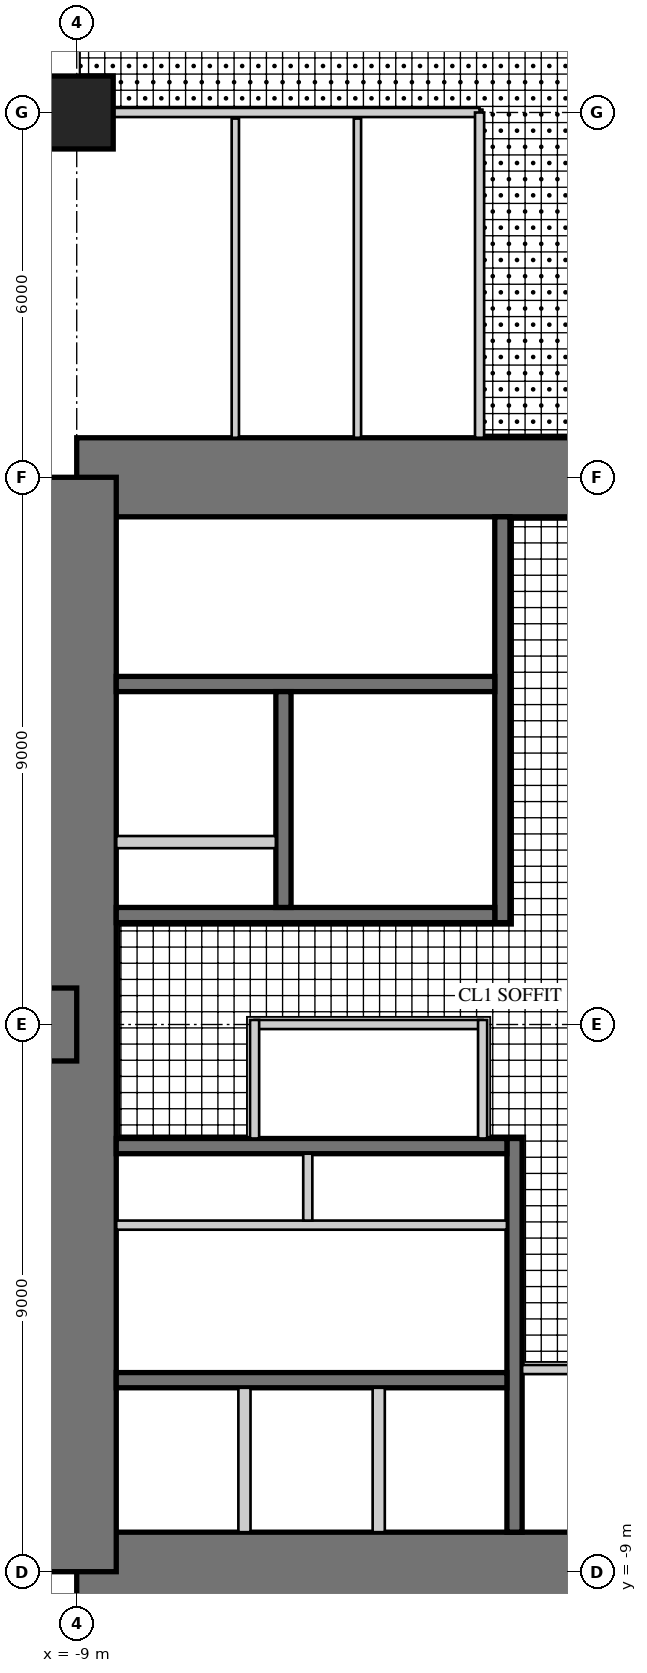
"""IFC4 building model, lengths in metres.
Left out: names, types, materials, properties, quantities, classifications, styles, units other than length and angle.
Written with IfcOpenShell. Run it as: python <this file> out.ifc"""

import sys

from ifc_helpers import new_model, si_unit, direction, frame, frame_2d, origin, origin_2d, place, context, subcontext, project, spatial, rectangle, extrude, element, fill, save


model = new_model("IFC4")
c1 = context("Model", 3, precision=1e-05, world=origin(), true_north=direction((0.0, 1.0)))
c2 = subcontext(c1, "Body", "Model", "MODEL_VIEW")
j1 = project(units=[si_unit("LENGTHUNIT", "METRE"), si_unit("PLANEANGLEUNIT", "RADIAN")], contexts=[c1])
p1 = place(None, origin())
s1 = spatial("IfcSite", under=j1, at=p1, CompositionType="ELEMENT")
p2 = place(p1, origin())
s2 = spatial("IfcBuilding", under=s1, at=p2, CompositionType="ELEMENT")
p3 = place(p2, frame((0.0, 0.0, 59.5)))
s3 = spatial("IfcBuildingStorey", under=s2, at=p3, CompositionType="ELEMENT", Elevation=59.5)
p4 = place(p3, frame((9.0, 9.0, 0.0), z_axis=(0.0, 0.0, 1.0), x_axis=(-1.0, 0.0, 0.0)))
e1 = element("IfcWall", 1, at=p4, inside=s3, PredefinedType="SHEAR", context=c2, shape_type="SweptSolid", body=[
    extrude(rectangle(XDim=18.0, YDim=1.3, at=frame_2d((9.0, 0.0))), origin(), (0.0, 0.0, 1.0), 4.0),
])
p5 = place(p4, frame((9.8, 0.0, 0.0)))
e2 = element("IfcOpeningElement", 2, at=p5, cuts=e1, PredefinedType="OPENING", context=c2, shape_type="SweptSolid", body=[
    extrude(rectangle(XDim=1.0, YDim=2.4, at=frame_2d((0.5, 1.2))), frame((0.0, 0.66, 0.0), z_axis=(0.0, -1.0, 0.0), x_axis=(1.0, 0.0, 0.0)), (0.0, 0.0, 1.0), 1.32),
])
p6 = place(p3, frame((-9.0, -9.0, 0.0), z_axis=(0.0, 0.0, 1.0), x_axis=(1.0, 0.0, 0.0)))
e3 = element("IfcWall", 3, at=p6, inside=s3, PredefinedType="SHEAR", context=c2, shape_type="SweptSolid", body=[
    extrude(rectangle(XDim=18.0, YDim=1.3, at=frame_2d((9.0, 0.0))), origin(), (0.0, 0.0, 1.0), 4.0),
])
p7 = place(p6, frame((9.8, 0.0, 0.0)))
e4 = element("IfcOpeningElement", 4, at=p7, cuts=e3, PredefinedType="OPENING", context=c2, shape_type="SweptSolid", body=[
    extrude(rectangle(XDim=1.0, YDim=2.4, at=frame_2d((0.5, 1.2))), frame((0.0, 0.66, 0.0), z_axis=(0.0, -1.0, 0.0), x_axis=(1.0, 0.0, 0.0)), (0.0, 0.0, 1.0), 1.32),
])
p8 = place(p3, frame((-9.0, 9.0, 0.0), z_axis=(0.0, 0.0, 1.0), x_axis=(0.0, -1.0, 0.0)))
e5 = element("IfcWall", 5, at=p8, inside=s3, PredefinedType="SHEAR", context=c2, shape_type="SweptSolid", body=[
    extrude(rectangle(XDim=18.0, YDim=1.3, at=frame_2d((9.0, 0.0))), origin(), (0.0, 0.0, 1.0), 4.0),
])
p9 = place(p8, frame((9.8, 0.0, 0.0)))
e6 = element("IfcOpeningElement", 6, at=p9, cuts=e5, PredefinedType="OPENING", context=c2, shape_type="SweptSolid", body=[
    extrude(rectangle(XDim=1.0, YDim=2.4, at=frame_2d((0.5, 1.2))), frame((0.0, 0.66, 0.0), z_axis=(0.0, -1.0, 0.0), x_axis=(1.0, 0.0, 0.0)), (0.0, 0.0, 1.0), 1.32),
])
p10 = place(p3, frame((-2.0, 1.675, 0.0), z_axis=(0.0, 0.0, 1.0), x_axis=(0.0, 1.0, 0.0)))
e7 = element("IfcWall", 7, at=p10, inside=s3, PredefinedType="SHEAR", context=c2, shape_type="SweptSolid", body=[
    extrude(rectangle(XDim=6.675, YDim=0.25, at=frame_2d((3.337, 0.0))), origin(), (0.0, 0.0, 1.0), 4.0),
])
p11 = place(p10, frame((0.725, 0.0, 0.0)))
e8 = element("IfcOpeningElement", 8, at=p11, cuts=e7, PredefinedType="OPENING", context=c2, shape_type="SweptSolid", body=[
    extrude(rectangle(XDim=1.0, YDim=2.1, at=frame_2d((0.5, 1.05))), frame((0.0, 0.135, 0.0), z_axis=(0.0, -1.0, 0.0), x_axis=(1.0, 0.0, 0.0)), (0.0, 0.0, 1.0), 0.27),
])
p12 = place(p3, frame((-2.125, 1.8, 0.0), z_axis=(0.0, 0.0, 1.0), x_axis=(-1.0, 0.0, 0.0)))
e9 = element("IfcWall", 9, at=p12, inside=s3, PredefinedType="SHEAR", context=c2, shape_type="SweptSolid", body=[
    extrude(rectangle(XDim=6.225, YDim=0.25, at=frame_2d((3.113, 0.0))), origin(), (0.0, 0.0, 1.0), 4.0),
])
p13 = place(p3, frame((-2.125, 5.6, 0.0), z_axis=(0.0, 0.0, 1.0), x_axis=(-1.0, 0.0, 0.0)))
e10 = element("IfcWall", 10, at=p13, inside=s3, PredefinedType="SHEAR", context=c2, shape_type="SweptSolid", body=[
    extrude(rectangle(XDim=6.225, YDim=0.25, at=frame_2d((3.113, 0.0))), origin(), (0.0, 0.0, 1.0), 4.0),
])
p14 = place(p13, frame((0.175, 0.0, 0.0)))
e11 = element("IfcOpeningElement", 11, at=p14, cuts=e10, PredefinedType="OPENING", context=c2, shape_type="SweptSolid", body=[
    extrude(rectangle(XDim=1.0, YDim=2.1, at=frame_2d((0.5, 1.05))), frame((0.0, 0.135, 0.0), z_axis=(0.0, -1.0, 0.0), x_axis=(1.0, 0.0, 0.0)), (0.0, 0.0, 1.0), 0.27),
])
p15 = place(p3, frame((-5.6, 1.925, 0.0), z_axis=(0.0, 0.0, 1.0), x_axis=(0.0, 1.0, 0.0)))
e12 = element("IfcWall", 12, at=p15, inside=s3, PredefinedType="SHEAR", context=c2, shape_type="SweptSolid", body=[
    extrude(rectangle(XDim=3.55, YDim=0.25, at=frame_2d((1.775, 0.0))), origin(), (0.0, 0.0, 1.0), 4.0),
])
p16 = place(p15, frame((1.525, 0.0, 0.0)))
e13 = element("IfcOpeningElement", 13, at=p16, cuts=e12, PredefinedType="OPENING", context=c2, shape_type="SweptSolid", body=[
    extrude(rectangle(XDim=1.1, YDim=2.2, at=frame_2d((0.55, 1.1))), frame((0.0, 0.135, 0.0), z_axis=(0.0, -1.0, 0.0), x_axis=(1.0, 0.0, 0.0)), (0.0, 0.0, 1.0), 0.27),
])
p17 = place(p15, frame((0.075, 0.0, 0.0)))
e14 = element("IfcOpeningElement", 14, at=p17, cuts=e12, PredefinedType="OPENING", context=c2, shape_type="SweptSolid", body=[
    extrude(rectangle(XDim=0.8, YDim=2.1, at=frame_2d((0.4, 1.05))), frame((0.0, 0.135, 0.0), z_axis=(0.0, -1.0, 0.0), x_axis=(1.0, 0.0, 0.0)), (0.0, 0.0, 1.0), 0.27),
])
p18 = place(p3, frame((-5.725, 3.0, 0.0), z_axis=(0.0, 0.0, 1.0), x_axis=(-1.0, 0.0, 0.0)))
e15 = element("IfcWall", 15, at=p18, inside=s3, PredefinedType="PARTITIONING", context=c2, shape_type="SweptSolid", body=[
    extrude(rectangle(XDim=2.625, YDim=0.2, at=frame_2d((1.312, 0.0))), origin(), (0.0, 0.0, 1.0), 4.0),
])
p19 = place(p3, frame((-1.8, -1.875, 0.0), z_axis=(0.0, 0.0, 1.0), x_axis=(0.0, -1.0, 0.0)))
e16 = element("IfcWall", 16, at=p19, inside=s3, PredefinedType="SHEAR", context=c2, shape_type="SweptSolid", body=[
    extrude(rectangle(XDim=6.475, YDim=0.25, at=frame_2d((3.238, 0.0))), origin(), (0.0, 0.0, 1.0), 4.0),
])
p20 = place(p19, frame((1.875, 0.0, 0.0)))
e17 = element("IfcOpeningElement", 17, at=p20, cuts=e16, PredefinedType="OPENING", context=c2, shape_type="SweptSolid", body=[
    extrude(rectangle(XDim=1.6, YDim=2.4, at=frame_2d((0.8, 1.2))), frame((0.0, 0.135, 0.0), z_axis=(0.0, -1.0, 0.0), x_axis=(1.0, 0.0, 0.0)), (0.0, 0.0, 1.0), 0.27),
])
for number, where, z_axis, x_axis in (
    (18, (-1.925, -2.0, 0.0), (0.0, 0.0, 1.0), (-1.0, 0.0, 0.0)),
    (19, (-1.925, -5.85, 0.0), (0.0, 0.0, 1.0), (-1.0, 0.0, 0.0)),
):
    element("IfcWall", number, at=place(p3, frame(where, z_axis=z_axis, x_axis=x_axis)), inside=s3, PredefinedType="SHEAR", context=c2, shape_type="SweptSolid", body=[
        extrude(rectangle(XDim=6.425, YDim=0.25, at=frame_2d((3.212, 0.0))), origin(), (0.0, 0.0, 1.0), 4.0),
    ])
p21 = place(p3, frame((-1.925, -3.3, 0.0), z_axis=(0.0, 0.0, 1.0), x_axis=(-1.0, 0.0, 0.0)))
e20 = element("IfcWall", 20, at=p21, inside=s3, PredefinedType="PARTITIONING", context=c2, shape_type="SweptSolid", body=[
    extrude(rectangle(XDim=6.425, YDim=0.15, at=frame_2d((3.212, 0.0))), origin(), (0.0, 0.0, 1.0), 4.0),
])
p22 = place(p21, frame((0.075, 0.0, 0.0)))
e21 = element("IfcOpeningElement", 21, at=p22, cuts=e20, PredefinedType="OPENING", context=c2, shape_type="SweptSolid", body=[
    extrude(rectangle(XDim=0.8, YDim=2.1, at=frame_2d((0.4, 1.05))), frame((0.0, 0.085, 0.0), z_axis=(0.0, -1.0, 0.0), x_axis=(1.0, 0.0, 0.0)), (0.0, 0.0, 1.0), 0.17),
])
p23 = place(p21, frame((3.675, 0.0, 0.0)))
e22 = element("IfcOpeningElement", 22, at=p23, cuts=e20, PredefinedType="OPENING", context=c2, shape_type="SweptSolid", body=[
    extrude(rectangle(XDim=0.8, YDim=2.1, at=frame_2d((0.4, 1.05))), frame((0.0, 0.085, 0.0), z_axis=(0.0, -1.0, 0.0), x_axis=(1.0, 0.0, 0.0)), (0.0, 0.0, 1.0), 0.17),
])
p24 = place(p3, frame((-5.2, -2.125, 0.0), z_axis=(0.0, 0.0, 1.0), x_axis=(0.0, -1.0, 0.0)))
e23 = element("IfcWall", 23, at=p24, inside=s3, PredefinedType="PARTITIONING", context=c2, shape_type="SweptSolid", body=[
    extrude(rectangle(XDim=1.1, YDim=0.15, at=frame_2d((0.55, 0.0))), origin(), (0.0, 0.0, 1.0), 4.0),
])
for number, where, z_axis, x_axis in (
    (24, (-4.033, -5.975, 0.0), (0.0, 0.0, 1.0), (0.0, -1.0, 0.0)),
    (25, (-6.242, -5.975, 0.0), (0.0, 0.0, 1.0), (0.0, -1.0, 0.0)),
):
    element("IfcWall", number, at=place(p3, frame(where, z_axis=z_axis, x_axis=x_axis)), inside=s3, PredefinedType="PARTITIONING", context=c2, shape_type="SweptSolid", body=[
        extrude(rectangle(XDim=2.375, YDim=0.2, at=frame_2d((1.188, 0.0))), origin(), (0.0, 0.0, 1.0), 4.0),
    ])
p25 = place(p3, frame((-9.0, 0.0, 0.0), z_axis=(0.0, 0.0, 1.0), x_axis=(-1.0, 0.0, 0.0)))
e26 = element("IfcWall", 26, at=p25, inside=s3, PredefinedType="SHEAR", context=c2, shape_type="SweptSolid", body=[
    extrude(rectangle(XDim=18.0, YDim=1.2, at=frame_2d((9.0, 0.0))), origin(), (0.0, 0.0, 1.0), 4.0),
])
p26 = place(p25, frame((9.9, 0.0, 0.0)))
e27 = element("IfcOpeningElement", 27, at=p26, cuts=e26, PredefinedType="OPENING", context=c2, shape_type="SweptSolid", body=[
    extrude(rectangle(XDim=1.0, YDim=2.2, at=frame_2d((0.5, 1.1))), frame((0.0, 0.61, 0.0), z_axis=(0.0, -1.0, 0.0), x_axis=(1.0, 0.0, 0.0)), (0.0, 0.0, 1.0), 1.22),
])
p27 = place(p3, frame((-9.0, 15.0, 0.0), z_axis=(0.0, 0.0, 1.0), x_axis=(1.0, 0.0, 0.0)))
e28 = element("IfcColumn", 28, at=p27, inside=s3, PredefinedType="COLUMN", context=c2, shape_type="SweptSolid", body=[
    extrude(rectangle(XDim=1.2, YDim=1.2, at=origin_2d()), origin(), (0.0, 0.0, 1.0), 4.0),
])
p28 = place(p3, frame((-2.325, 0.0, 0.0), z_axis=(0.0, 0.0, 1.0), x_axis=(-1.0, 0.0, 0.0)))
e29 = element("IfcWall", 29, at=p28, inside=s3, PredefinedType="PARTITIONING", context=c2, shape_type="SweptSolid", body=[
    extrude(rectangle(XDim=3.75, YDim=0.15, at=frame_2d((1.875, 0.0))), origin(), (0.0, 0.0, 1.0), 3.8),
])
p29 = place(p28, frame((0.4, 0.0, 0.0)))
e30 = element("IfcOpeningElement", 30, at=p29, cuts=e29, PredefinedType="OPENING", context=c2, shape_type="SweptSolid", body=[
    extrude(rectangle(XDim=1.0, YDim=2.1, at=frame_2d((0.5, 1.05))), frame((0.0, 0.085, 0.0), z_axis=(0.0, -1.0, 0.0), x_axis=(1.0, 0.0, 0.0)), (0.0, 0.0, 1.0), 0.17),
])
for number, where, z_axis, x_axis in (
    (31, (-2.325, -1.875, 0.0), (0.0, 0.0, 1.0), (0.0, 1.0, 0.0)),
    (32, (-6.075, 0.075, 0.0), (0.0, 0.0, 1.0), (0.0, -1.0, 0.0)),
):
    element("IfcWall", number, at=place(p3, frame(where, z_axis=z_axis, x_axis=x_axis)), inside=s3, PredefinedType="PARTITIONING", context=c2, shape_type="SweptSolid", body=[
        extrude(rectangle(XDim=1.95, YDim=0.15, at=frame_2d((0.975, 0.0))), origin(), (0.0, 0.0, 1.0), 3.8),
    ])
p30 = place(p3, frame((-1.675, -5.675, 0.0), z_axis=(0.0, 0.0, 1.0), x_axis=(1.0, 0.0, 0.0)))
e33 = element("IfcWall", 33, at=p30, inside=s3, PredefinedType="PARTITIONING", context=c2, shape_type="SweptSolid", body=[
    extrude(rectangle(XDim=1.75, YDim=0.15, at=frame_2d((0.875, 0.0))), origin(), (0.0, 0.0, 1.0), 3.8),
])
p31 = place(p3, frame((-2.375, 15.0, 0.0), z_axis=(0.0, 0.0, 1.0), x_axis=(-1.0, 0.0, 0.0)))
e34 = element("IfcWall", 34, at=p31, inside=s3, PredefinedType="PARTITIONING", context=c2, shape_type="SweptSolid", body=[
    extrude(rectangle(XDim=6.025, YDim=0.15, at=frame_2d((3.012, 0.0))), origin(), (0.0, 0.0, 1.0), 2.95),
])
p32 = place(p31, frame((0.504, 0.0, 0.0)))
e35 = element("IfcOpeningElement", 35, at=p32, cuts=e34, PredefinedType="OPENING", context=c2, shape_type="SweptSolid", body=[
    extrude(rectangle(XDim=1.0, YDim=2.1, at=frame_2d((0.5, 1.05))), frame((0.0, 0.085, 0.0), z_axis=(0.0, -1.0, 0.0), x_axis=(1.0, 0.0, 0.0)), (0.0, 0.0, 1.0), 0.17),
])
p33 = place(p31, frame((2.512, 0.0, 0.0)))
e36 = element("IfcOpeningElement", 36, at=p33, cuts=e34, PredefinedType="OPENING", context=c2, shape_type="SweptSolid", body=[
    extrude(rectangle(XDim=1.0, YDim=2.1, at=frame_2d((0.5, 1.05))), frame((0.0, 0.085, 0.0), z_axis=(0.0, -1.0, 0.0), x_axis=(1.0, 0.0, 0.0)), (0.0, 0.0, 1.0), 0.17),
])
p34 = place(p31, frame((4.521, 0.0, 0.0)))
e37 = element("IfcOpeningElement", 37, at=p34, cuts=e34, PredefinedType="OPENING", context=c2, shape_type="SweptSolid", body=[
    extrude(rectangle(XDim=1.0, YDim=2.1, at=frame_2d((0.5, 1.05))), frame((0.0, 0.085, 0.0), z_axis=(0.0, -1.0, 0.0), x_axis=(1.0, 0.0, 0.0)), (0.0, 0.0, 1.0), 0.17),
])
p35 = place(p3, frame((-2.375, 9.65, 0.0), z_axis=(0.0, 0.0, 1.0), x_axis=(0.0, 1.0, 0.0)))
e38 = element("IfcWall", 38, at=p35, inside=s3, PredefinedType="PARTITIONING", context=c2, shape_type="SweptSolid", body=[
    extrude(rectangle(XDim=5.35, YDim=0.15, at=frame_2d((2.675, 0.0))), origin(), (0.0, 0.0, 1.0), 3.8),
])
for number, where, z_axis, x_axis in (
    (39, (-4.383, 9.65, 0.0), (0.0, 0.0, 1.0), (0.0, 1.0, 0.0)),
    (40, (-6.392, 9.65, 0.0), (0.0, 0.0, 1.0), (0.0, 1.0, 0.0)),
):
    element("IfcWall", number, at=place(p3, frame(where, z_axis=z_axis, x_axis=x_axis)), inside=s3, PredefinedType="PLUMBINGWALL", context=c2, shape_type="SweptSolid", body=[
        extrude(rectangle(XDim=5.25, YDim=0.12, at=frame_2d((2.625, 0.0))), origin(), (0.0, 0.0, 1.0), 3.8),
    ])
p36 = place(p29, origin())
e41 = element("IfcDoor", 41, at=p36, inside=s3, OperationType="SINGLE_SWING_LEFT", PredefinedType="DOOR", context=c2, shape_type="SweptSolid", body=[
    extrude(rectangle(XDim=1.0, YDim=2.1, at=frame_2d((0.5, 1.05))), frame((0.0, 0.025, 0.0), z_axis=(0.0, -1.0, 0.0), x_axis=(1.0, 0.0, 0.0)), (0.0, 0.0, 1.0), 0.05),
])
fill(e30, e41)
p37 = place(p32, origin())
e42 = element("IfcDoor", 42, at=p37, inside=s3, OperationType="SINGLE_SWING_LEFT", PredefinedType="DOOR", context=c2, shape_type="SweptSolid", body=[
    extrude(rectangle(XDim=1.0, YDim=2.1, at=frame_2d((0.5, 1.05))), frame((0.0, 0.025, 0.0), z_axis=(0.0, -1.0, 0.0), x_axis=(1.0, 0.0, 0.0)), (0.0, 0.0, 1.0), 0.05),
])
fill(e35, e42)
p38 = place(p33, origin())
e43 = element("IfcDoor", 43, at=p38, inside=s3, OperationType="SINGLE_SWING_LEFT", PredefinedType="DOOR", context=c2, shape_type="SweptSolid", body=[
    extrude(rectangle(XDim=1.0, YDim=2.1, at=frame_2d((0.5, 1.05))), frame((0.0, 0.025, 0.0), z_axis=(0.0, -1.0, 0.0), x_axis=(1.0, 0.0, 0.0)), (0.0, 0.0, 1.0), 0.05),
])
fill(e36, e43)
p39 = place(p34, origin())
e44 = element("IfcDoor", 44, at=p39, inside=s3, OperationType="SINGLE_SWING_LEFT", PredefinedType="DOOR", context=c2, shape_type="SweptSolid", body=[
    extrude(rectangle(XDim=1.0, YDim=2.1, at=frame_2d((0.5, 1.05))), frame((0.0, 0.025, 0.0), z_axis=(0.0, -1.0, 0.0), x_axis=(1.0, 0.0, 0.0)), (0.0, 0.0, 1.0), 0.05),
])
fill(e37, e44)
p40 = place(p5, frame((1.0, 0.0, 0.0), z_axis=(0.0, 0.0, 1.0), x_axis=(-1.0, 0.0, 0.0)))
e45 = element("IfcDoor", 45, at=p40, inside=s3, OperationType="SINGLE_SWING_RIGHT", PredefinedType="DOOR", context=c2, shape_type="SweptSolid", body=[
    extrude(rectangle(XDim=1.0, YDim=2.4, at=frame_2d((0.5, 1.2))), frame((0.0, -0.005, 0.0), z_axis=(0.0, -1.0, 0.0), x_axis=(1.0, 0.0, 0.0)), (0.0, 0.0, 1.0), 0.05),
])
fill(e2, e45)
p41 = place(p9, frame((1.0, 0.0, 0.0), z_axis=(0.0, 0.0, 1.0), x_axis=(-1.0, 0.0, 0.0)))
e46 = element("IfcDoor", 46, at=p41, inside=s3, OperationType="SINGLE_SWING_RIGHT", PredefinedType="DOOR", context=c2, shape_type="SweptSolid", body=[
    extrude(rectangle(XDim=1.0, YDim=2.4, at=frame_2d((0.5, 1.2))), frame((0.0, -0.005, 0.0), z_axis=(0.0, -1.0, 0.0), x_axis=(1.0, 0.0, 0.0)), (0.0, 0.0, 1.0), 0.05),
])
fill(e6, e46)
p42 = place(p11, origin())
e47 = element("IfcDoor", 47, at=p42, inside=s3, OperationType="SINGLE_SWING_LEFT", PredefinedType="DOOR", context=c2, shape_type="SweptSolid", body=[
    extrude(rectangle(XDim=1.0, YDim=2.1, at=frame_2d((0.5, 1.05))), frame((0.0, 0.025, 0.0), z_axis=(0.0, -1.0, 0.0), x_axis=(1.0, 0.0, 0.0)), (0.0, 0.0, 1.0), 0.05),
])
fill(e8, e47)
p43 = place(p14, frame((1.0, 0.0, 0.0), z_axis=(0.0, 0.0, 1.0), x_axis=(-1.0, 0.0, 0.0)))
e48 = element("IfcDoor", 48, at=p43, inside=s3, OperationType="SINGLE_SWING_RIGHT", PredefinedType="DOOR", context=c2, shape_type="SweptSolid", body=[
    extrude(rectangle(XDim=1.0, YDim=2.1, at=frame_2d((0.5, 1.05))), frame((0.0, 0.025, 0.0), z_axis=(0.0, -1.0, 0.0), x_axis=(1.0, 0.0, 0.0)), (0.0, 0.0, 1.0), 0.05),
])
fill(e11, e48)
p44 = place(p16, origin())
e49 = element("IfcDoor", 49, at=p44, inside=s3, OperationType="DOUBLE_DOOR_SLIDING", PredefinedType="DOOR", context=c2, shape_type="SweptSolid", body=[
    extrude(rectangle(XDim=1.1, YDim=2.2, at=frame_2d((0.55, 1.1))), frame((0.0, 0.025, 0.0), z_axis=(0.0, -1.0, 0.0), x_axis=(1.0, 0.0, 0.0)), (0.0, 0.0, 1.0), 0.05),
])
fill(e13, e49)
p45 = place(p17, origin())
e50 = element("IfcDoor", 50, at=p45, inside=s3, OperationType="SINGLE_SWING_LEFT", PredefinedType="DOOR", context=c2, shape_type="SweptSolid", body=[
    extrude(rectangle(XDim=0.8, YDim=2.1, at=frame_2d((0.4, 1.05))), frame((0.0, 0.025, 0.0), z_axis=(0.0, -1.0, 0.0), x_axis=(1.0, 0.0, 0.0)), (0.0, 0.0, 1.0), 0.05),
])
fill(e14, e50)
p46 = place(p20, frame((1.6, 0.0, 0.0), z_axis=(0.0, 0.0, 1.0), x_axis=(-1.0, 0.0, 0.0)))
e51 = element("IfcDoor", 51, at=p46, inside=s3, OperationType="DOUBLE_DOOR_SINGLE_SWING", PredefinedType="DOOR", context=c2, shape_type="SweptSolid", body=[
    extrude(rectangle(XDim=1.6, YDim=2.4, at=frame_2d((0.8, 1.2))), frame((0.0, 0.025, 0.0), z_axis=(0.0, -1.0, 0.0), x_axis=(1.0, 0.0, 0.0)), (0.0, 0.0, 1.0), 0.05),
])
fill(e17, e51)
p47 = place(p22, frame((0.8, 0.0, 0.0), z_axis=(0.0, 0.0, 1.0), x_axis=(-1.0, 0.0, 0.0)))
e52 = element("IfcDoor", 52, at=p47, inside=s3, OperationType="SINGLE_SWING_RIGHT", PredefinedType="DOOR", context=c2, shape_type="SweptSolid", body=[
    extrude(rectangle(XDim=0.8, YDim=2.1, at=frame_2d((0.4, 1.05))), frame((0.0, 0.025, 0.0), z_axis=(0.0, -1.0, 0.0), x_axis=(1.0, 0.0, 0.0)), (0.0, 0.0, 1.0), 0.05),
])
fill(e21, e52)
p48 = place(p23, frame((0.8, 0.0, 0.0), z_axis=(0.0, 0.0, 1.0), x_axis=(-1.0, 0.0, 0.0)))
e53 = element("IfcDoor", 53, at=p48, inside=s3, OperationType="SINGLE_SWING_RIGHT", PredefinedType="DOOR", context=c2, shape_type="SweptSolid", body=[
    extrude(rectangle(XDim=0.8, YDim=2.1, at=frame_2d((0.4, 1.05))), frame((0.0, 0.025, 0.0), z_axis=(0.0, -1.0, 0.0), x_axis=(1.0, 0.0, 0.0)), (0.0, 0.0, 1.0), 0.05),
])
fill(e22, e53)
save(model, sys.argv[1])
